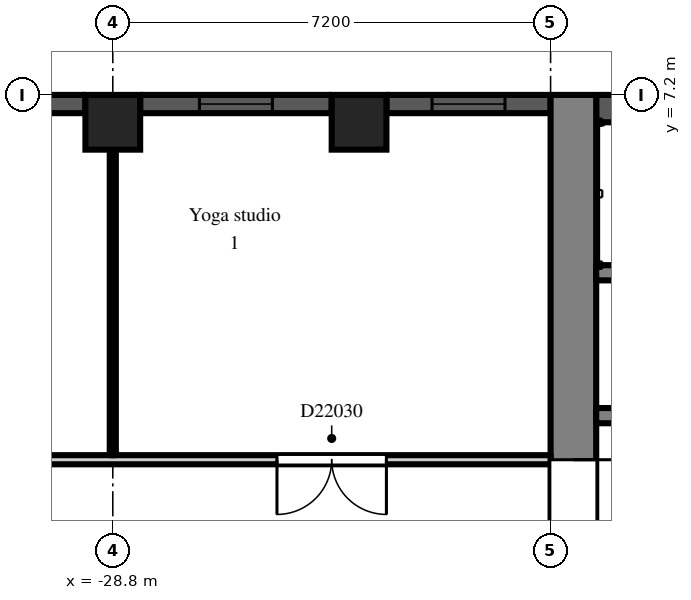
"""IFC4 building model, lengths in metres.
Left out: names, types, materials, properties, quantities, classifications, styles, units other than length and angle.
Written with IfcOpenShell. Run it as: python <this file> out.ifc"""

import sys

from ifc_helpers import new_model, si_unit, direction, frame, frame_2d, origin, origin_2d, place, context, subcontext, project, spatial, rectangle, extrude, element, fill, save


model = new_model("IFC4")
c1 = context("Model", 3, precision=1e-05, world=origin(), true_north=direction((0.0, 1.0)))
c2 = subcontext(c1, "Body", "Model", "MODEL_VIEW")
j1 = project(units=[si_unit("LENGTHUNIT", "METRE"), si_unit("PLANEANGLEUNIT", "RADIAN")], contexts=[c1])
p1 = place(None, origin())
s1 = spatial("IfcSite", under=j1, at=p1, CompositionType="ELEMENT")
p2 = place(p1, origin())
s2 = spatial("IfcBuilding", under=s1, at=p2, CompositionType="ELEMENT")
p3 = place(p2, frame((0.0, 0.0, 156.3)))
s3 = spatial("IfcBuildingStorey", under=s2, at=p3, CompositionType="ELEMENT", Elevation=156.3)
for number, where, z_axis, x_axis in (
    (1, (-28.8, 6.75, 0.0), (0.0, 0.0, 1.0), (1.0, 0.0, 0.0)),
    (2, (-24.75, 6.75, 0.0), (0.0, 0.0, 1.0), (1.0, 0.0, 0.0)),
):
    element("IfcColumn", number, at=place(p3, frame(where, z_axis=z_axis, x_axis=x_axis)), inside=s3, PredefinedType="COLUMN", context=c2, shape_type="SweptSolid", body=[
        extrude(rectangle(XDim=0.9, YDim=0.9, at=origin_2d()), origin(), (0.0, 0.0, 1.0), 3.0),
    ])
p4 = place(p3, frame((-21.6, 7.05, 0.0), z_axis=(0.0, 0.0, 1.0), x_axis=(-1.0, 0.0, 0.0)))
e3 = element("IfcWall", 3, at=p4, inside=s3, PredefinedType="SOLIDWALL", context=c2, shape_type="SweptSolid", body=[
    extrude(rectangle(XDim=2.7, YDim=0.3, at=frame_2d((1.35, 0.0))), origin(), (0.0, 0.0, 1.0), 2.2),
])
p5 = place(p4, frame((0.75, 0.0, 0.2)))
e4 = element("IfcOpeningElement", 4, at=p5, cuts=e3, PredefinedType="OPENING", context=c2, shape_type="SweptSolid", body=[
    extrude(rectangle(XDim=1.2, YDim=1.85, at=frame_2d((0.6, 0.925))), frame((0.0, 0.16, 0.0), z_axis=(0.0, -1.0, 0.0), x_axis=(1.0, 0.0, 0.0)), (0.0, 0.0, 1.0), 0.32),
])
p6 = place(p3, frame((-25.2, 7.05, 0.0), z_axis=(0.0, 0.0, 1.0), x_axis=(-1.0, 0.0, 0.0)))
e5 = element("IfcWall", 5, at=p6, inside=s3, PredefinedType="SOLIDWALL", context=c2, shape_type="SweptSolid", body=[
    extrude(rectangle(XDim=3.15, YDim=0.3, at=frame_2d((1.575, 0.0))), origin(), (0.0, 0.0, 1.0), 2.2),
])
p7 = place(p6, frame((0.975, 0.0, 0.2)))
e6 = element("IfcOpeningElement", 6, at=p7, cuts=e5, PredefinedType="OPENING", context=c2, shape_type="SweptSolid", body=[
    extrude(rectangle(XDim=1.2, YDim=1.85, at=frame_2d((0.6, 0.925))), frame((0.0, 0.16, 0.0), z_axis=(0.0, -1.0, 0.0), x_axis=(1.0, 0.0, 0.0)), (0.0, 0.0, 1.0), 0.32),
])
p8 = place(p3, frame((-29.25, 7.05, 0.0), z_axis=(0.0, 0.0, 1.0), x_axis=(-1.0, 0.0, 0.0)))
e7 = element("IfcWall", 7, at=p8, inside=s3, PredefinedType="SOLIDWALL", context=c2, shape_type="SweptSolid", body=[
    extrude(rectangle(XDim=6.3, YDim=0.3, at=frame_2d((3.15, 0.0))), origin(), (0.0, 0.0, 1.0), 2.2),
])
p9 = place(p8, frame((0.975, 0.0, 0.2)))
e8 = element("IfcOpeningElement", 8, at=p9, cuts=e7, PredefinedType="OPENING", context=c2, shape_type="SweptSolid", body=[
    extrude(rectangle(XDim=1.2, YDim=1.85, at=frame_2d((0.6, 0.925))), frame((0.0, 0.16, 0.0), z_axis=(0.0, -1.0, 0.0), x_axis=(1.0, 0.0, 0.0)), (0.0, 0.0, 1.0), 0.32),
])
p10 = place(p8, frame((4.125, 0.0, 0.2)))
e9 = element("IfcOpeningElement", 9, at=p10, cuts=e7, PredefinedType="OPENING", context=c2, shape_type="SweptSolid", body=[
    extrude(rectangle(XDim=1.2, YDim=1.85, at=frame_2d((0.6, 0.925))), frame((0.0, 0.16, 0.0), z_axis=(0.0, -1.0, 0.0), x_axis=(1.0, 0.0, 0.0)), (0.0, 0.0, 1.0), 0.32),
])
p11 = place(p3, frame((-21.225, -7.2, 0.0), z_axis=(0.0, 0.0, 1.0), x_axis=(0.0, 1.0, 0.0)))
e10 = element("IfcWall", 10, at=p11, inside=s3, PredefinedType="SHEAR", context=c2, shape_type="SweptSolid", body=[
    extrude(rectangle(XDim=14.4, YDim=0.75, at=frame_2d((7.2, 0.0))), origin(), (0.0, 0.0, 1.0), 2.6),
])
p12 = place(p11, frame((6.0, 0.0, 0.0)))
e11 = element("IfcOpeningElement", 11, at=p12, cuts=e10, PredefinedType="OPENING", context=c2, shape_type="SweptSolid", body=[
    extrude(rectangle(XDim=2.4, YDim=2.2, at=frame_2d((1.2, 1.1))), frame((0.0, 0.385, 0.0), z_axis=(0.0, -1.0, 0.0), x_axis=(1.0, 0.0, 0.0)), (0.0, 0.0, 1.0), 0.77),
])
p13 = place(p3, frame((-7.9, 6.975, 0.0), z_axis=(0.0, 0.0, 1.0), x_axis=(-1.0, 0.0, 0.0)))
e12 = element("IfcWall", 12, at=p13, inside=s3, PredefinedType="SHEAR", context=c2, shape_type="SweptSolid", body=[
    extrude(rectangle(XDim=12.95, YDim=0.45, at=frame_2d((6.475, 0.0))), origin(), (0.0, 0.0, 1.0), 2.6),
])
p14 = place(p3, frame((-7.9, 1.925, 0.0), z_axis=(0.0, 0.0, 1.0), x_axis=(-1.0, 0.0, 0.0)))
e13 = element("IfcWall", 13, at=p14, inside=s3, PredefinedType="SHEAR", context=c2, shape_type="SweptSolid", body=[
    extrude(rectangle(XDim=12.95, YDim=0.25, at=frame_2d((6.475, 0.0))), origin(), (0.0, 0.0, 1.0), 2.6),
])
p15 = place(p14, frame((4.825, 0.0, 0.0)))
e14 = element("IfcOpeningElement", 14, at=p15, cuts=e13, PredefinedType="OPENING", context=c2, shape_type="SweptSolid", body=[
    extrude(rectangle(XDim=1.1, YDim=2.1, at=frame_2d((0.55, 1.05))), frame((0.0, 0.135, 0.0), z_axis=(0.0, -1.0, 0.0), x_axis=(1.0, 0.0, 0.0)), (0.0, 0.0, 1.0), 0.27),
])
p16 = place(p14, frame((7.025, 0.0, 0.0)))
e15 = element("IfcOpeningElement", 15, at=p16, cuts=e13, PredefinedType="OPENING", context=c2, shape_type="SweptSolid", body=[
    extrude(rectangle(XDim=1.1, YDim=2.1, at=frame_2d((0.55, 1.05))), frame((0.0, 0.135, 0.0), z_axis=(0.0, -1.0, 0.0), x_axis=(1.0, 0.0, 0.0)), (0.0, 0.0, 1.0), 0.27),
])
p17 = place(p14, frame((9.225, 0.0, 0.0)))
e16 = element("IfcOpeningElement", 16, at=p17, cuts=e13, PredefinedType="OPENING", context=c2, shape_type="SweptSolid", body=[
    extrude(rectangle(XDim=1.1, YDim=2.1, at=frame_2d((0.55, 1.05))), frame((0.0, 0.135, 0.0), z_axis=(0.0, -1.0, 0.0), x_axis=(1.0, 0.0, 0.0)), (0.0, 0.0, 1.0), 0.27),
])
p18 = place(p14, frame((0.525, 0.0, 0.0)))
e17 = element("IfcOpeningElement", 17, at=p18, cuts=e13, PredefinedType="OPENING", context=c2, shape_type="SweptSolid", body=[
    extrude(rectangle(XDim=0.9, YDim=2.1, at=frame_2d((0.45, 1.05))), frame((0.0, 0.135, 0.0), z_axis=(0.0, -1.0, 0.0), x_axis=(1.0, 0.0, 0.0)), (0.0, 0.0, 1.0), 0.27),
])
p19 = place(p14, frame((2.625, 0.0, 0.0)))
e18 = element("IfcOpeningElement", 18, at=p19, cuts=e13, PredefinedType="OPENING", context=c2, shape_type="SweptSolid", body=[
    extrude(rectangle(XDim=1.1, YDim=2.1, at=frame_2d((0.55, 1.05))), frame((0.0, 0.135, 0.0), z_axis=(0.0, -1.0, 0.0), x_axis=(1.0, 0.0, 0.0)), (0.0, 0.0, 1.0), 0.27),
])
p20 = place(p14, frame((11.525, 0.0, 0.0)))
e19 = element("IfcOpeningElement", 19, at=p20, cuts=e13, PredefinedType="OPENING", context=c2, shape_type="SweptSolid", body=[
    extrude(rectangle(XDim=0.9, YDim=2.1, at=frame_2d((0.45, 1.05))), frame((0.0, 0.135, 0.0), z_axis=(0.0, -1.0, 0.0), x_axis=(1.0, 0.0, 0.0)), (0.0, 0.0, 1.0), 0.27),
])
p21 = place(p3, frame((-12.3, 4.275, 0.0), z_axis=(0.0, 0.0, 1.0), x_axis=(-1.0, 0.0, 0.0)))
e20 = element("IfcWall", 20, at=p21, inside=s3, PredefinedType="SHEAR", context=c2, shape_type="SweptSolid", body=[
    extrude(rectangle(XDim=8.55, YDim=0.25, at=frame_2d((4.275, 0.0))), origin(), (0.0, 0.0, 1.0), 2.6),
])
p22 = place(p3, frame((-36.5, 1.2, 0.0), z_axis=(0.0, 0.0, 1.0), x_axis=(1.0, 0.0, 0.0)))
e21 = element("IfcWall", 21, at=p22, inside=s3, PredefinedType="PARTITIONING", context=c2, shape_type="SweptSolid", body=[
    extrude(rectangle(XDim=14.9, YDim=0.15, at=frame_2d((7.45, 0.0))), origin(), (0.0, 0.0, 1.0), 2.6),
])
p23 = place(p22, frame((10.4, 0.0, 0.0)))
e22 = element("IfcOpeningElement", 22, at=p23, cuts=e21, PredefinedType="OPENING", context=c2, shape_type="SweptSolid", body=[
    extrude(rectangle(XDim=1.8, YDim=2.1, at=frame_2d((0.9, 1.05))), frame((0.0, 0.085, 0.0), z_axis=(0.0, -1.0, 0.0), x_axis=(1.0, 0.0, 0.0)), (0.0, 0.0, 1.0), 0.17),
])
p24 = place(p22, frame((5.45, 0.0, 0.0)))
e23 = element("IfcOpeningElement", 23, at=p24, cuts=e21, PredefinedType="OPENING", context=c2, shape_type="SweptSolid", body=[
    extrude(rectangle(XDim=0.9, YDim=2.1, at=frame_2d((0.45, 1.05))), frame((0.0, 0.085, 0.0), z_axis=(0.0, -1.0, 0.0), x_axis=(1.0, 0.0, 0.0)), (0.0, 0.0, 1.0), 0.17),
])
p25 = place(p22, frame((1.15, 0.0, 0.0)))
e24 = element("IfcOpeningElement", 24, at=p25, cuts=e21, PredefinedType="OPENING", context=c2, shape_type="SweptSolid", body=[
    extrude(rectangle(XDim=1.8, YDim=2.1, at=frame_2d((0.9, 1.05))), frame((0.0, 0.085, 0.0), z_axis=(0.0, -1.0, 0.0), x_axis=(1.0, 0.0, 0.0)), (0.0, 0.0, 1.0), 0.17),
])
p26 = place(p3, frame((-28.8, 1.275, 0.0), z_axis=(0.0, 0.0, 1.0), x_axis=(0.0, 1.0, 0.0)))
e25 = element("IfcWall", 25, at=p26, inside=s3, PredefinedType="PARTITIONING", context=c2, shape_type="SweptSolid", body=[
    extrude(rectangle(XDim=5.625, YDim=0.1, at=frame_2d((2.812, 0.0))), origin(), (0.0, 0.0, 1.0), 2.6),
])
p27 = place(p5, origin())
e26 = element("IfcWindow", 26, at=p27, inside=s3, PartitioningType="SINGLE_PANEL", PredefinedType="WINDOW", context=c2, shape_type="SweptSolid", body=[
    extrude(rectangle(XDim=1.2, YDim=1.85, at=frame_2d((0.6, 0.925))), frame((0.0, 0.03, 0.0), z_axis=(0.0, -1.0, 0.0), x_axis=(1.0, 0.0, 0.0)), (0.0, 0.0, 1.0), 0.06),
])
fill(e4, e26)
p28 = place(p7, origin())
e27 = element("IfcWindow", 27, at=p28, inside=s3, PartitioningType="SINGLE_PANEL", PredefinedType="WINDOW", context=c2, shape_type="SweptSolid", body=[
    extrude(rectangle(XDim=1.2, YDim=1.85, at=frame_2d((0.6, 0.925))), frame((0.0, 0.03, 0.0), z_axis=(0.0, -1.0, 0.0), x_axis=(1.0, 0.0, 0.0)), (0.0, 0.0, 1.0), 0.06),
])
fill(e6, e27)
p29 = place(p12, frame((2.4, 0.0, 0.0), z_axis=(0.0, 0.0, 1.0), x_axis=(-1.0, 0.0, 0.0)))
e28 = element("IfcDoor", 28, at=p29, inside=s3, OperationType="DOUBLE_DOOR_DOUBLE_SWING", PredefinedType="DOOR", context=c2, shape_type="SweptSolid", body=[
    extrude(rectangle(XDim=2.4, YDim=2.2, at=frame_2d((1.2, 1.1))), frame((0.0, 0.025, 0.0), z_axis=(0.0, -1.0, 0.0), x_axis=(1.0, 0.0, 0.0)), (0.0, 0.0, 1.0), 0.05),
])
fill(e11, e28)
p30 = place(p23, frame((1.8, 0.0, 0.0), z_axis=(0.0, 0.0, 1.0), x_axis=(-1.0, 0.0, 0.0)))
e29 = element("IfcDoor", 29, at=p30, inside=s3, OperationType="DOUBLE_DOOR_DOUBLE_SWING", PredefinedType="DOOR", context=c2, shape_type="SweptSolid", body=[
    extrude(rectangle(XDim=1.8, YDim=2.1, at=frame_2d((0.9, 1.05))), frame((0.0, 0.025, 0.0), z_axis=(0.0, -1.0, 0.0), x_axis=(1.0, 0.0, 0.0)), (0.0, 0.0, 1.0), 0.05),
])
fill(e22, e29)
save(model, sys.argv[1])
